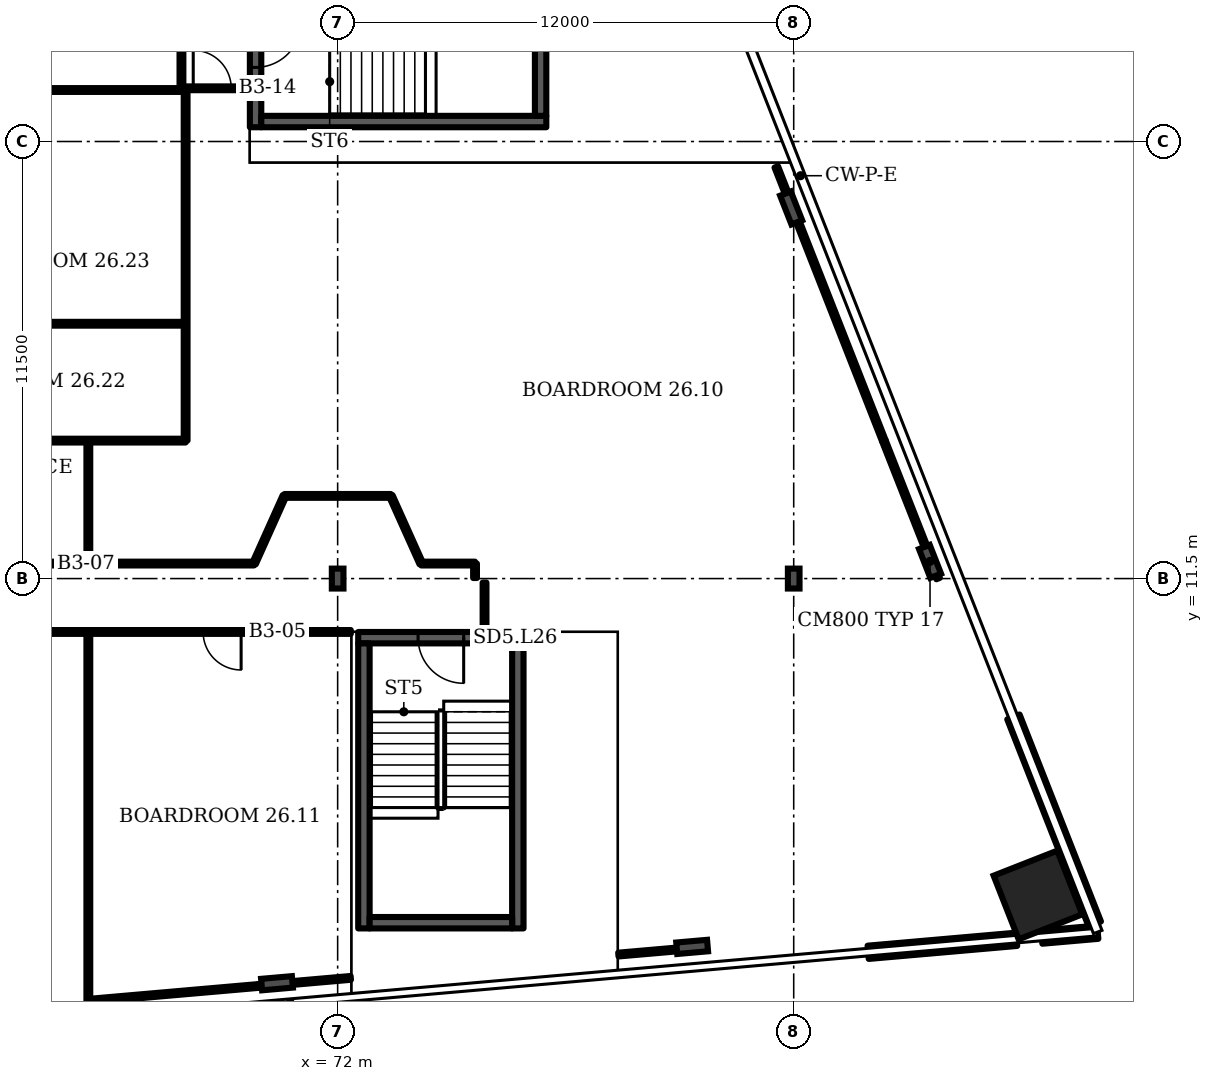
"""IFC4 building model, lengths in metres.
Left out: names, types, materials, properties, quantities, classifications, styles, units other than length and angle.
Written with IfcOpenShell. Run it as: python <this file> out.ifc"""

import sys

from ifc_helpers import new_model, si_unit, direction, frame, frame_2d, origin, origin_2d, place, context, subcontext, project, spatial, rectangle, i_section, extrude, element, fill, save


model = new_model("IFC4")
c1 = context("Model", 3, precision=1e-05, world=origin(), true_north=direction((0.0, 1.0)))
c2 = subcontext(c1, "Body", "Model", "MODEL_VIEW")
j1 = project(units=[si_unit("LENGTHUNIT", "METRE"), si_unit("PLANEANGLEUNIT", "RADIAN")], contexts=[c1])
p1 = place(None, origin())
s1 = spatial("IfcSite", under=j1, at=p1, CompositionType="ELEMENT")
p2 = place(p1, origin())
s2 = spatial("IfcBuilding", under=s1, at=p2, CompositionType="ELEMENT")
p3 = place(p2, frame((0.0, 0.0, 114.7)))
s3 = spatial("IfcBuildingStorey", under=s2, at=p3, CompositionType="ELEMENT", Elevation=114.7)
p4 = place(p3, frame((90.427, 3.174, 0.0), z_axis=(0.0, 0.0, 1.0), x_axis=(-0.365778, 0.930702, 0.0)))
e1 = element("IfcColumn", 1, at=p4, inside=s3, PredefinedType="COLUMN", context=c2, shape_type="SweptSolid", body=[
    extrude(rectangle(XDim=1.8, YDim=1.8, at=origin_2d()), origin(), (0.0, 0.0, 1.0), 3.6),
])
for number, where, z_axis, x_axis in (
    (2, (70.404, 0.853, 0.0), (0.0, 0.0, 1.0), (0.087, -0.996, 0.0)),
    (3, (81.328, 1.808, 0.0), (0.0, 0.0, 1.0), (0.087, -0.996, 0.0)),
    (4, (87.587, 11.952, 0.0), (0.0, 0.0, 1.0), (0.931, 0.366, 0.0)),
    (5, (83.933, 21.251, 0.0), (0.0, 0.0, 1.0), (0.931, 0.366, 0.0)),
):
    element("IfcColumn", number, at=place(p3, frame(where, z_axis=z_axis, x_axis=x_axis)), inside=s3, PredefinedType="COLUMN", context=c2, shape_type="SweptSolid", body=[
        extrude(i_section(OverallWidth=0.303, OverallDepth=0.814, WebThickness=0.021, FlangeThickness=0.04, FilletRadius=0.03, at=origin_2d()), origin(), (0.0, 0.0, 1.0), 3.6),
    ])
for number, where, z_axis, x_axis in (
    (6, (72.0, 11.5, 0.0), (0.0, 0.0, 1.0), (1.0, 0.0, 0.0)),
    (7, (84.0, 11.5, 0.0), (0.0, 0.0, 1.0), (1.0, 0.0, 0.0)),
):
    element("IfcColumn", number, at=place(p3, frame(where, z_axis=z_axis, x_axis=x_axis)), inside=s3, PredefinedType="COLUMN", context=c2, shape_type="SweptSolid", body=[
        extrude(i_section(OverallWidth=0.306, OverallDepth=0.524, WebThickness=0.021, FlangeThickness=0.04, FilletRadius=0.027, at=origin_2d()), origin(), (0.0, 0.0, 1.0), 3.6),
    ])
p5 = place(p3, frame((85.959, 1.667, 0.0), z_axis=(0.0, 0.0, 1.0), x_axis=(0.996194, 0.087167, 0.0)))
e8 = element("IfcWall", 8, at=p5, inside=s3, PredefinedType="SOLIDWALL", context=c2, shape_type="SweptSolid", body=[
    extrude(rectangle(XDim=3.921, YDim=0.35, at=frame_2d((1.96, 0.0))), origin(), (0.0, 0.0, 1.0), 1.0),
])
p6 = place(p3, frame((90.527, 2.066, 0.0), z_axis=(0.0, 0.0, 1.0), x_axis=(0.996198, 0.087157, 0.0)))
e9 = element("IfcWall", 9, at=p6, inside=s3, PredefinedType="SOLIDWALL", context=c2, shape_type="SweptSolid", body=[
    extrude(rectangle(XDim=1.479, YDim=0.35, at=frame_2d((0.74, 0.0))), origin(), (0.0, 0.0, 1.0), 1.0),
])
p7 = place(p3, frame((91.921, 2.414, 0.0), z_axis=(0.0, 0.0, 1.0), x_axis=(-0.36578, 0.930701, 0.0)))
e10 = element("IfcWall", 10, at=p7, inside=s3, PredefinedType="SOLIDWALL", context=c2, shape_type="SweptSolid", body=[
    extrude(rectangle(XDim=5.852, YDim=0.35, at=frame_2d((2.926, 0.0))), origin(), (0.0, 0.0, 1.0), 1.0),
])
p8 = place(p3, frame((72.541, 9.945, 0.0), z_axis=(0.0, 0.0, 1.0), x_axis=(1.0, 0.0, 0.0)))
e11 = element("IfcWall", 11, at=p8, inside=s3, PredefinedType="SHEAR", context=c2, shape_type="SweptSolid", body=[
    extrude(rectangle(XDim=4.35, YDim=0.3, at=frame_2d((2.175, 0.0))), origin(), (0.0, 0.0, 1.0), 3.2),
])
p9 = place(p8, frame((1.575, 0.0, 0.0)))
e12 = element("IfcOpeningElement", 12, at=p9, cuts=e11, PredefinedType="OPENING", context=c2, shape_type="SweptSolid", body=[
    extrude(rectangle(XDim=1.2, YDim=2.1, at=frame_2d((0.6, 1.05))), frame((0.0, 0.16, 0.0), z_axis=(0.0, -1.0, 0.0), x_axis=(1.0, 0.0, 0.0)), (0.0, 0.0, 1.0), 0.32),
])
p10 = place(p3, frame((69.84, 23.375, 0.0), z_axis=(0.0, 0.0, 1.0), x_axis=(0.0, 1.0, 0.0)))
e13 = element("IfcWall", 13, at=p10, inside=s3, PredefinedType="SHEAR", context=c2, shape_type="SweptSolid", body=[
    extrude(rectangle(XDim=4.35, YDim=0.3, at=frame_2d((2.175, 0.0))), origin(), (0.0, 0.0, 1.0), 3.2),
])
p11 = place(p10, frame((1.575, 0.0, 0.0)))
e14 = element("IfcOpeningElement", 14, at=p11, cuts=e13, PredefinedType="OPENING", context=c2, shape_type="SweptSolid", body=[
    extrude(rectangle(XDim=1.2, YDim=2.1, at=frame_2d((0.6, 1.05))), frame((0.0, 0.16, 0.0), z_axis=(0.0, -1.0, 0.0), x_axis=(1.0, 0.0, 0.0)), (0.0, 0.0, 1.0), 0.32),
])
for number, where, z_axis, x_axis in (
    (15, (59.4, 15.13, 0.0), (0.0, 0.0, 1.0), (1.0, 0.0, 0.0)),
    (16, (59.4, 18.205, 0.0), (0.0, 0.0, 1.0), (1.0, 0.0, 0.0)),
    (17, (59.4, 24.355, 0.0), (0.0, 0.0, 1.0), (1.0, 0.0, 0.0)),
):
    element("IfcWall", number, at=place(p3, frame(where, z_axis=z_axis, x_axis=x_axis)), inside=s3, PredefinedType="PARTITIONING", context=c2, shape_type="SweptSolid", body=[
        extrude(rectangle(XDim=8.6, YDim=0.1, at=frame_2d((4.3, 0.0))), origin(), (0.0, 0.0, 1.0), 3.2),
    ])
p12 = place(p3, frame((62.2, 10.095, 0.0), z_axis=(0.0, 0.0, 1.0), x_axis=(1.0, 0.0, 0.0)))
e18 = element("IfcWall", 18, at=p12, inside=s3, PredefinedType="PARTITIONING", context=c2, shape_type="SweptSolid", body=[
    extrude(rectangle(XDim=10.146, YDim=0.1, at=frame_2d((5.073, 0.0))), origin(), (0.0, 0.0, 1.0), 3.2),
])
p13 = place(p12, frame((6.26, 0.0, 0.0)))
e19 = element("IfcOpeningElement", 19, at=p13, cuts=e18, PredefinedType="OPENING", context=c2, shape_type="SweptSolid", body=[
    extrude(rectangle(XDim=1.0, YDim=2.1, at=frame_2d((0.5, 1.05))), frame((0.0, 0.06, 0.0), z_axis=(0.0, -1.0, 0.0), x_axis=(1.0, 0.0, 0.0)), (0.0, 0.0, 1.0), 0.12),
])
p14 = place(p3, frame((62.2, 11.895, 0.0), z_axis=(0.0, 0.0, 1.0), x_axis=(1.0, 0.0, 0.0)))
e20 = element("IfcWall", 20, at=p14, inside=s3, PredefinedType="PARTITIONING", context=c2, shape_type="SweptSolid", body=[
    extrude(rectangle(XDim=7.6, YDim=0.1, at=frame_2d((3.8, 0.0))), origin(), (0.0, 0.0, 1.0), 3.2),
])
p15 = place(p14, frame((1.22, 0.0, 0.0)))
e21 = element("IfcOpeningElement", 21, at=p15, cuts=e20, PredefinedType="OPENING", context=c2, shape_type="SweptSolid", body=[
    extrude(rectangle(XDim=1.0, YDim=2.1, at=frame_2d((0.5, 1.05))), frame((0.0, 0.06, 0.0), z_axis=(0.0, -1.0, 0.0), x_axis=(1.0, 0.0, 0.0)), (0.0, 0.0, 1.0), 0.12),
])
p16 = place(p3, frame((65.44, 0.39, 0.0), z_axis=(0.0, 0.0, 1.0), x_axis=(0.996214, 0.086949, 0.0)))
e22 = element("IfcWall", 22, at=p16, inside=s3, PredefinedType="PARTITIONING", context=c2, shape_type="SweptSolid", body=[
    extrude(rectangle(XDim=4.487, YDim=0.1, at=frame_2d((2.244, 0.0))), origin(), (0.0, 0.0, 1.0), 2.58),
])
p17 = place(p3, frame((65.44, 0.39, 0.0), z_axis=(0.0, 0.0, 1.0), x_axis=(0.0, 1.0, 0.0)))
e23 = element("IfcWall", 23, at=p17, inside=s3, PredefinedType="PARTITIONING", context=c2, shape_type="SweptSolid", body=[
    extrude(rectangle(XDim=9.705, YDim=0.1, at=frame_2d((4.853, 0.0))), origin(), (0.0, 0.0, 1.0), 3.2),
])
p18 = place(p3, frame((65.44, 11.895, 0.0), z_axis=(0.0, 0.0, 1.0), x_axis=(0.0, 1.0, 0.0)))
e24 = element("IfcWall", 24, at=p18, inside=s3, PredefinedType="PARTITIONING", context=c2, shape_type="SweptSolid", body=[
    extrude(rectangle(XDim=3.235, YDim=0.1, at=frame_2d((1.617, 0.0))), origin(), (0.0, 0.0, 1.0), 3.2),
])
p19 = place(p3, frame((67.89, 24.4, 0.0), z_axis=(0.0, 0.0, 1.0), x_axis=(0.0, 1.0, 0.0)))
e25 = element("IfcWall", 25, at=p19, inside=s3, PredefinedType="PARTITIONING", context=c2, shape_type="SweptSolid", body=[
    extrude(rectangle(XDim=4.485, YDim=0.1, at=frame_2d((2.243, 0.0))), origin(), (0.0, 0.0, 1.0), 3.2),
])
p20 = place(p3, frame((68.0, 24.4, 0.0), z_axis=(0.0, 0.0, 1.0), x_axis=(1.0, 0.0, 0.0)))
e26 = element("IfcWall", 26, at=p20, inside=s3, PredefinedType="PARTITIONING", context=c2, shape_type="SweptSolid", body=[
    extrude(rectangle(XDim=1.67, YDim=0.1, at=frame_2d((0.835, 0.0))), origin(), (0.0, 0.0, 1.0), 3.2),
])
p21 = place(p20, frame((0.2, 0.0, 0.0)))
e27 = element("IfcOpeningElement", 27, at=p21, cuts=e26, PredefinedType="OPENING", context=c2, shape_type="SweptSolid", body=[
    extrude(rectangle(XDim=1.0, YDim=2.1, at=frame_2d((0.5, 1.05))), frame((0.0, 0.06, 0.0), z_axis=(0.0, -1.0, 0.0), x_axis=(1.0, 0.0, 0.0)), (0.0, 0.0, 1.0), 0.12),
])
p22 = place(p3, frame((68.0, 15.13, 0.0), z_axis=(0.0, 0.0, 1.0), x_axis=(0.0, 1.0, 0.0)))
e28 = element("IfcWall", 28, at=p22, inside=s3, PredefinedType="PARTITIONING", context=c2, shape_type="SweptSolid", body=[
    extrude(rectangle(XDim=9.22, YDim=0.1, at=frame_2d((4.61, 0.0))), origin(), (0.0, 0.0, 1.0), 3.2),
])
p23 = place(p3, frame((69.8, 11.895, 0.0), z_axis=(0.0, 0.0, 1.0), x_axis=(0.409954, 0.912107, 0.0)))
e29 = element("IfcWall", 29, at=p23, inside=s3, PredefinedType="PARTITIONING", context=c2, shape_type="SweptSolid", body=[
    extrude(rectangle(XDim=1.952, YDim=0.1, at=frame_2d((0.976, 0.0))), origin(), (0.0, 0.0, 1.0), 3.2),
])
p24 = place(p3, frame((69.91, 0.78, 0.0), z_axis=(0.0, 0.0, 1.0), x_axis=(0.99619, 0.087259, 0.0)))
e30 = element("IfcWall", 30, at=p24, inside=s3, PredefinedType="PARTITIONING", context=c2, shape_type="SweptSolid", body=[
    extrude(rectangle(XDim=2.445, YDim=0.1, at=frame_2d((1.223, 0.0))), origin(), (0.0, 0.0, 1.0), 2.58),
])
p25 = place(p3, frame((70.6, 13.675, 0.0), z_axis=(0.0, 0.0, 1.0), x_axis=(1.0, 0.0, 0.0)))
e31 = element("IfcWall", 31, at=p25, inside=s3, PredefinedType="PARTITIONING", context=c2, shape_type="SweptSolid", body=[
    extrude(rectangle(XDim=2.8, YDim=0.1, at=frame_2d((1.4, 0.0))), origin(), (0.0, 0.0, 1.0), 3.2),
])
p26 = place(p3, frame((74.2, 11.895, 0.0), z_axis=(0.0, 0.0, 1.0), x_axis=(1.0, 0.0, 0.0)))
e32 = element("IfcWall", 32, at=p26, inside=s3, PredefinedType="PARTITIONING", context=c2, shape_type="SweptSolid", body=[
    extrude(rectangle(XDim=1.415, YDim=0.1, at=frame_2d((0.708, 0.0))), origin(), (0.0, 0.0, 1.0), 3.2),
])
p27 = place(p3, frame((74.2, 11.895, 0.0), z_axis=(0.0, 0.0, 1.0), x_axis=(-0.409954, 0.912107, 0.0)))
e33 = element("IfcWall", 33, at=p27, inside=s3, PredefinedType="PARTITIONING", context=c2, shape_type="SweptSolid", body=[
    extrude(rectangle(XDim=1.952, YDim=0.1, at=frame_2d((0.976, 0.0))), origin(), (0.0, 0.0, 1.0), 3.2),
])
p28 = place(p3, frame((75.615, 11.515, 0.0), z_axis=(0.0, 0.0, 1.0), x_axis=(0.0, 1.0, 0.0)))
e34 = element("IfcWall", 34, at=p28, inside=s3, PredefinedType="PARTITIONING", context=c2, shape_type="SweptSolid", body=[
    extrude(rectangle(XDim=0.38, YDim=0.1, at=frame_2d((0.19, 0.0))), origin(), (0.0, 0.0, 1.0), 3.2),
])
p29 = place(p3, frame((75.865, 10.115, 0.0), z_axis=(0.0, 0.0, 1.0), x_axis=(0.0, 1.0, 0.0)))
e35 = element("IfcWall", 35, at=p29, inside=s3, PredefinedType="PARTITIONING", context=c2, shape_type="SweptSolid", body=[
    extrude(rectangle(XDim=1.28, YDim=0.1, at=frame_2d((0.64, 0.0))), origin(), (0.0, 0.0, 1.0), 3.2),
])
p30 = place(p3, frame((79.386, 1.607, 0.0), z_axis=(0.0, 0.0, 1.0), x_axis=(0.996228, 0.08682, 0.0)))
e36 = element("IfcWall", 36, at=p30, inside=s3, PredefinedType="PARTITIONING", context=c2, shape_type="SweptSolid", body=[
    extrude(rectangle(XDim=1.997, YDim=0.1, at=frame_2d((0.998, 0.0))), origin(), (0.0, 0.0, 1.0), 2.58),
])
p31 = place(p3, frame((86.37, 15.13, 0.0), z_axis=(0.0, 0.0, 1.0), x_axis=(-0.365535, 0.930794, 0.0)))
e37 = element("IfcWall", 37, at=p31, inside=s3, PredefinedType="PARTITIONING", context=c2, shape_type="SweptSolid", body=[
    extrude(rectangle(XDim=7.739, YDim=0.1, at=frame_2d((3.87, 0.0))), origin(), (0.0, 0.0, 1.0), 2.58),
])
p32 = place(p3, frame((87.8, 11.5, 0.0), z_axis=(0.0, 0.0, 1.0), x_axis=(-0.366521, 0.930414, 0.0)))
e38 = element("IfcWall", 38, at=p32, inside=s3, PredefinedType="PARTITIONING", context=c2, shape_type="SweptSolid", body=[
    extrude(rectangle(XDim=3.901, YDim=0.1, at=frame_2d((1.951, 0.0))), origin(), (0.0, 0.0, 1.0), 2.58),
])
for number, where, z_axis, x_axis in (
    (39, (72.691, 2.295, 0.0), (0.0, 0.0, 1.0), (0.0, 1.0, 0.0)),
    (40, (76.741, 2.295, 0.0), (0.0, 0.0, 1.0), (0.0, 1.0, 0.0)),
):
    element("IfcWall", number, at=place(p3, frame(where, z_axis=z_axis, x_axis=x_axis)), inside=s3, PredefinedType="SHEAR", context=c2, shape_type="SweptSolid", body=[
        extrude(rectangle(XDim=7.5, YDim=0.3, at=frame_2d((3.75, 0.0))), origin(), (0.0, 0.0, 1.0), 3.2),
    ])
p33 = place(p3, frame((72.841, 2.445, 0.0), z_axis=(0.0, 0.0, 1.0), x_axis=(1.0, 0.0, 0.0)))
e41 = element("IfcWall", 41, at=p33, inside=s3, PredefinedType="SHEAR", context=c2, shape_type="SweptSolid", body=[
    extrude(rectangle(XDim=3.75, YDim=0.3, at=frame_2d((1.875, 0.0))), origin(), (0.0, 0.0, 1.0), 3.2),
])
p34 = place(p3, frame((69.99, 23.525, 0.0), z_axis=(0.0, 0.0, 1.0), x_axis=(1.0, 0.0, 0.0)))
e42 = element("IfcWall", 42, at=p34, inside=s3, PredefinedType="SHEAR", context=c2, shape_type="SweptSolid", body=[
    extrude(rectangle(XDim=7.5, YDim=0.3, at=frame_2d((3.75, 0.0))), origin(), (0.0, 0.0, 1.0), 3.2),
])
p35 = place(p3, frame((77.34, 23.675, 0.0), z_axis=(0.0, 0.0, 1.0), x_axis=(0.0, 1.0, 0.0)))
e43 = element("IfcWall", 43, at=p35, inside=s3, PredefinedType="SHEAR", context=c2, shape_type="SweptSolid", body=[
    extrude(rectangle(XDim=3.75, YDim=0.3, at=frame_2d((1.875, 0.0))), origin(), (0.0, 0.0, 1.0), 3.2),
])
p36 = place(p9, origin())
e44 = element("IfcDoor", 44, at=p36, inside=s3, OperationType="SINGLE_SWING_RIGHT", PredefinedType="DOOR", context=c2, shape_type="SweptSolid", body=[
    extrude(rectangle(XDim=1.2, YDim=2.1, at=frame_2d((0.6, 1.05))), frame((0.0, 0.025, 0.0), z_axis=(0.0, -1.0, 0.0), x_axis=(1.0, 0.0, 0.0)), (0.0, 0.0, 1.0), 0.05),
])
fill(e12, e44)
p37 = place(p11, origin())
e45 = element("IfcDoor", 45, at=p37, inside=s3, OperationType="SINGLE_SWING_RIGHT", PredefinedType="DOOR", context=c2, shape_type="SweptSolid", body=[
    extrude(rectangle(XDim=1.2, YDim=2.1, at=frame_2d((0.6, 1.05))), frame((0.0, 0.025, 0.0), z_axis=(0.0, -1.0, 0.0), x_axis=(1.0, 0.0, 0.0)), (0.0, 0.0, 1.0), 0.05),
])
fill(e14, e45)
p38 = place(p13, origin())
e46 = element("IfcDoor", 46, at=p38, inside=s3, OperationType="SINGLE_SWING_RIGHT", PredefinedType="DOOR", context=c2, shape_type="SweptSolid", body=[
    extrude(rectangle(XDim=1.0, YDim=2.1, at=frame_2d((0.5, 1.05))), frame((0.0, 0.025, 0.0), z_axis=(0.0, -1.0, 0.0), x_axis=(1.0, 0.0, 0.0)), (0.0, 0.0, 1.0), 0.05),
])
fill(e19, e46)
p39 = place(p21, origin())
e47 = element("IfcDoor", 47, at=p39, inside=s3, OperationType="SINGLE_SWING_LEFT", PredefinedType="DOOR", context=c2, shape_type="SweptSolid", body=[
    extrude(rectangle(XDim=1.0, YDim=2.1, at=frame_2d((0.5, 1.05))), frame((0.0, 0.025, 0.0), z_axis=(0.0, -1.0, 0.0), x_axis=(1.0, 0.0, 0.0)), (0.0, 0.0, 1.0), 0.05),
])
fill(e27, e47)
save(model, sys.argv[1])
